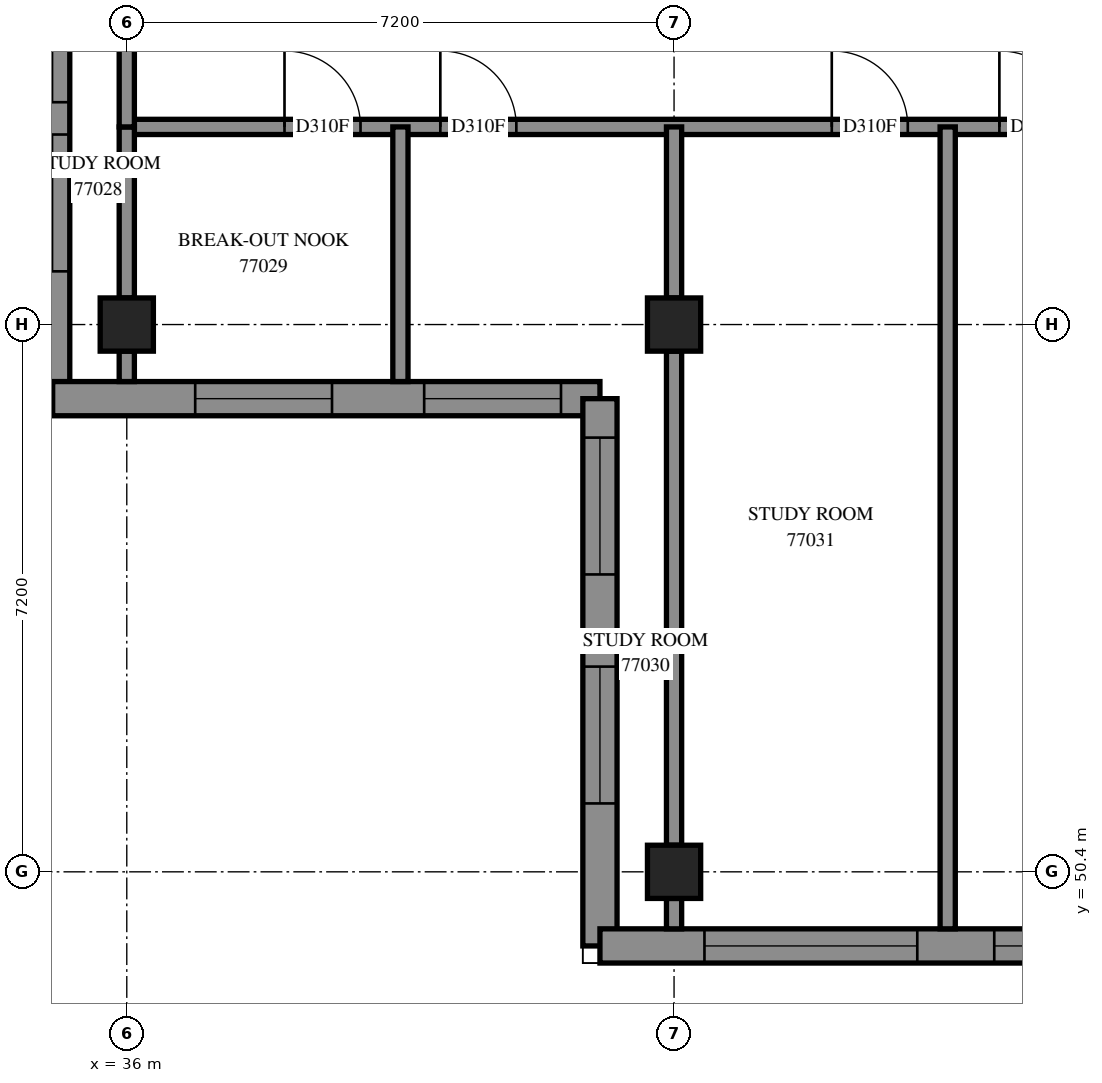
"""IFC4 building model, lengths in metres.
Left out: names, types, materials, properties, quantities, classifications, styles, units other than length and angle.
Written with IfcOpenShell. Run it as: python <this file> out.ifc"""

import sys

from ifc_helpers import new_model, si_unit, direction, frame, frame_2d, origin, origin_2d, place, context, subcontext, project, spatial, polyline, rectangle, outline, extrude, element, fill, save


model = new_model("IFC4")
c1 = context("Model", 3, precision=1e-05, world=origin(), true_north=direction((0.0, 1.0)))
c2 = subcontext(c1, "Body", "Model", "MODEL_VIEW")
j1 = project(units=[si_unit("LENGTHUNIT", "METRE"), si_unit("PLANEANGLEUNIT", "RADIAN")], contexts=[c1])
p1 = place(None, origin())
s1 = spatial("IfcSite", under=j1, at=p1, CompositionType="ELEMENT")
p2 = place(p1, origin())
s2 = spatial("IfcBuilding", under=s1, at=p2, CompositionType="ELEMENT")
p3 = place(p2, frame((0.0, 0.0, 281.2)))
s3 = spatial("IfcBuildingStorey", under=s2, at=p3, CompositionType="ELEMENT", Elevation=281.2)
for number, where, z_axis, x_axis in (
    (1, (36.0, 57.6, 0.0), (0.0, 0.0, 1.0), (1.0, 0.0, 0.0)),
    (2, (43.2, 50.4, 0.0), (0.0, 0.0, 1.0), (1.0, 0.0, 0.0)),
    (3, (43.2, 57.6, 0.0), (0.0, 0.0, 1.0), (1.0, 0.0, 0.0)),
):
    element("IfcColumn", number, at=place(p3, frame(where, z_axis=z_axis, x_axis=x_axis)), inside=s3, PredefinedType="COLUMN", context=c2, shape_type="SweptSolid", body=[
        extrude(rectangle(XDim=0.7, YDim=0.7, at=origin_2d()), origin(), (0.0, 0.0, 1.0), 3.1),
    ])
p4 = place(p3, frame((35.025, 63.825, 0.0), z_axis=(0.0, 0.0, 1.0), x_axis=(0.0, -1.0, 0.0)))
e4 = element("IfcWall", 4, at=p4, inside=s3, PredefinedType="SOLIDWALL", context=c2, shape_type="SweptSolid", body=[
    extrude(outline(polyline([(0.225, -0.225), (7.425, -0.225), (6.975, 0.225), (-0.225, 0.225), (0.225, -0.225)])), origin(), (0.0, 0.0, 1.0), 2.6),
])
p5 = place(p4, frame((3.725, 0.0, 0.6)))
e5 = element("IfcOpeningElement", 5, at=p5, cuts=e4, PredefinedType="OPENING", context=c2, shape_type="SweptSolid", body=[
    extrude(rectangle(XDim=1.8, YDim=1.9, at=frame_2d((0.9, 0.95))), frame((0.0, 0.235, 0.0), z_axis=(0.0, -1.0, 0.0), x_axis=(1.0, 0.0, 0.0)), (0.0, 0.0, 1.0), 0.47),
])
p6 = place(p4, frame((2.1, 0.0, 0.6)))
e6 = element("IfcOpeningElement", 6, at=p6, cuts=e4, PredefinedType="OPENING", context=c2, shape_type="SweptSolid", body=[
    extrude(rectangle(XDim=1.2, YDim=1.9, at=frame_2d((0.6, 0.95))), frame((0.0, 0.235, 0.0), z_axis=(0.0, -1.0, 0.0), x_axis=(1.0, 0.0, 0.0)), (0.0, 0.0, 1.0), 0.47),
])
p7 = place(p3, frame((35.025, 56.625, 0.0), z_axis=(0.0, 0.0, 1.0), x_axis=(1.0, 0.0, 0.0)))
e7 = element("IfcWall", 7, at=p7, inside=s3, PredefinedType="SOLIDWALL", context=c2, shape_type="SweptSolid", body=[
    extrude(outline(polyline([(-0.225, -0.225), (6.975, -0.225), (7.425, 0.225), (0.225, 0.225), (-0.225, -0.225)])), origin(), (0.0, 0.0, 1.0), 2.6),
])
p8 = place(p7, frame((1.875, 0.0, 0.6)))
e8 = element("IfcOpeningElement", 8, at=p8, cuts=e7, PredefinedType="OPENING", context=c2, shape_type="SweptSolid", body=[
    extrude(rectangle(XDim=1.8, YDim=1.9, at=frame_2d((0.9, 0.95))), frame((0.0, 0.235, 0.0), z_axis=(0.0, -1.0, 0.0), x_axis=(1.0, 0.0, 0.0)), (0.0, 0.0, 1.0), 0.47),
])
p9 = place(p7, frame((4.888, 0.0, 0.6)))
e9 = element("IfcOpeningElement", 9, at=p9, cuts=e7, PredefinedType="OPENING", context=c2, shape_type="SweptSolid", body=[
    extrude(rectangle(XDim=1.8, YDim=1.9, at=frame_2d((0.9, 0.95))), frame((0.0, 0.235, 0.0), z_axis=(0.0, -1.0, 0.0), x_axis=(1.0, 0.0, 0.0)), (0.0, 0.0, 1.0), 0.47),
])
p10 = place(p3, frame((42.225, 56.625, 0.0), z_axis=(0.0, 0.0, 1.0), x_axis=(0.0, -1.0, 0.0)))
e10 = element("IfcWall", 10, at=p10, inside=s3, PredefinedType="SOLIDWALL", context=c2, shape_type="SweptSolid", body=[
    extrude(outline(polyline([(0.225, -0.225), (7.425, -0.225), (6.975, 0.225), (-0.225, 0.225), (0.225, -0.225)])), origin(), (0.0, 0.0, 1.0), 2.6),
])
p11 = place(p10, frame((0.512, 0.0, 0.6)))
e11 = element("IfcOpeningElement", 11, at=p11, cuts=e10, PredefinedType="OPENING", context=c2, shape_type="SweptSolid", body=[
    extrude(rectangle(XDim=1.8, YDim=1.9, at=frame_2d((0.9, 0.95))), frame((0.0, 0.235, 0.0), z_axis=(0.0, -1.0, 0.0), x_axis=(1.0, 0.0, 0.0)), (0.0, 0.0, 1.0), 0.47),
])
p12 = place(p10, frame((3.525, 0.0, 0.6)))
e12 = element("IfcOpeningElement", 12, at=p12, cuts=e10, PredefinedType="OPENING", context=c2, shape_type="SweptSolid", body=[
    extrude(rectangle(XDim=1.8, YDim=1.9, at=frame_2d((0.9, 0.95))), frame((0.0, 0.235, 0.0), z_axis=(0.0, -1.0, 0.0), x_axis=(1.0, 0.0, 0.0)), (0.0, 0.0, 1.0), 0.47),
])
p13 = place(p3, frame((42.225, 49.425, 0.0), z_axis=(0.0, 0.0, 1.0), x_axis=(1.0, 0.0, 0.0)))
e13 = element("IfcWall", 13, at=p13, inside=s3, PredefinedType="SOLIDWALL", context=c2, shape_type="SweptSolid", body=[
    extrude(outline(polyline([(-0.225, -0.225), (6.975, -0.225), (7.425, 0.225), (0.225, 0.225), (-0.225, -0.225)])), origin(), (0.0, 0.0, 1.0), 3.1),
])
p14 = place(p13, frame((1.375, 0.0, 0.45)))
e14 = element("IfcOpeningElement", 14, at=p14, cuts=e13, PredefinedType="OPENING", context=c2, shape_type="SweptSolid", body=[
    extrude(rectangle(XDim=2.8, YDim=2.55, at=frame_2d((1.4, 1.275))), frame((0.0, 0.235, 0.0), z_axis=(0.0, -1.0, 0.0), x_axis=(1.0, 0.0, 0.0)), (0.0, 0.0, 1.0), 0.47),
])
p15 = place(p13, frame((5.188, 0.0, 0.45)))
e15 = element("IfcOpeningElement", 15, at=p15, cuts=e13, PredefinedType="OPENING", context=c2, shape_type="SweptSolid", body=[
    extrude(rectangle(XDim=1.2, YDim=2.55, at=frame_2d((0.6, 1.275))), frame((0.0, 0.235, 0.0), z_axis=(0.0, -1.0, 0.0), x_axis=(1.0, 0.0, 0.0)), (0.0, 0.0, 1.0), 0.47),
])
p16 = place(p3, frame((36.0, 60.2, 0.0), z_axis=(0.0, 0.0, 1.0), x_axis=(1.0, 0.0, 0.0)))
e16 = element("IfcWall", 16, at=p16, inside=s3, PredefinedType="PARTITIONING", context=c2, shape_type="SweptSolid", body=[
    extrude(rectangle(XDim=17.0, YDim=0.2, at=frame_2d((8.5, 0.0))), origin(), (0.0, 0.0, 1.0), 3.1),
])
p17 = place(p16, frame((15.802, 0.0, 0.0)))
e17 = element("IfcOpeningElement", 17, at=p17, cuts=e16, PredefinedType="OPENING", context=c2, shape_type="SweptSolid", body=[
    extrude(rectangle(XDim=1.0, YDim=2.1, at=frame_2d((0.5, 1.05))), frame((0.0, 0.11, 0.0), z_axis=(0.0, -1.0, 0.0), x_axis=(1.0, 0.0, 0.0)), (0.0, 0.0, 1.0), 0.22),
])
p18 = place(p16, frame((2.075, 0.0, 0.0)))
e18 = element("IfcOpeningElement", 18, at=p18, cuts=e16, PredefinedType="OPENING", context=c2, shape_type="SweptSolid", body=[
    extrude(rectangle(XDim=1.0, YDim=2.1, at=frame_2d((0.5, 1.05))), frame((0.0, 0.11, 0.0), z_axis=(0.0, -1.0, 0.0), x_axis=(1.0, 0.0, 0.0)), (0.0, 0.0, 1.0), 0.22),
])
p19 = place(p16, frame((4.125, 0.0, 0.0)))
e19 = element("IfcOpeningElement", 19, at=p19, cuts=e16, PredefinedType="OPENING", context=c2, shape_type="SweptSolid", body=[
    extrude(rectangle(XDim=1.0, YDim=2.1, at=frame_2d((0.5, 1.05))), frame((0.0, 0.11, 0.0), z_axis=(0.0, -1.0, 0.0), x_axis=(1.0, 0.0, 0.0)), (0.0, 0.0, 1.0), 0.22),
])
p20 = place(p16, frame((9.275, 0.0, 0.0)))
e20 = element("IfcOpeningElement", 20, at=p20, cuts=e16, PredefinedType="OPENING", context=c2, shape_type="SweptSolid", body=[
    extrude(rectangle(XDim=1.0, YDim=2.1, at=frame_2d((0.5, 1.05))), frame((0.0, 0.11, 0.0), z_axis=(0.0, -1.0, 0.0), x_axis=(1.0, 0.0, 0.0)), (0.0, 0.0, 1.0), 0.22),
])
p21 = place(p16, frame((11.48, 0.0, 0.0)))
e21 = element("IfcOpeningElement", 21, at=p21, cuts=e16, PredefinedType="OPENING", context=c2, shape_type="SweptSolid", body=[
    extrude(rectangle(XDim=1.0, YDim=2.1, at=frame_2d((0.5, 1.05))), frame((0.0, 0.11, 0.0), z_axis=(0.0, -1.0, 0.0), x_axis=(1.0, 0.0, 0.0)), (0.0, 0.0, 1.0), 0.22),
])
p22 = place(p3, frame((46.8, 49.65, 0.0), z_axis=(0.0, 0.0, 1.0), x_axis=(0.0, 1.0, 0.0)))
e22 = element("IfcWall", 22, at=p22, inside=s3, PredefinedType="PARTITIONING", context=c2, shape_type="SweptSolid", body=[
    extrude(rectangle(XDim=10.55, YDim=0.2, at=frame_2d((5.275, 0.0))), origin(), (0.0, 0.0, 1.0), 3.1),
])
p23 = place(p3, frame((43.2, 50.75, 0.0), z_axis=(0.0, 0.0, 1.0), x_axis=(0.0, 1.0, 0.0)))
e23 = element("IfcWall", 23, at=p23, inside=s3, PredefinedType="PARTITIONING", context=c2, shape_type="SweptSolid", body=[
    extrude(rectangle(XDim=6.5, YDim=0.2, at=frame_2d((3.25, 0.0))), origin(), (0.0, 0.0, 1.0), 2.6),
])
p24 = place(p3, frame((39.6, 56.85, 0.0), z_axis=(0.0, 0.0, 1.0), x_axis=(0.0, 1.0, 0.0)))
e24 = element("IfcWall", 24, at=p24, inside=s3, PredefinedType="PARTITIONING", context=c2, shape_type="SweptSolid", body=[
    extrude(rectangle(XDim=3.35, YDim=0.2, at=frame_2d((1.675, 0.0))), origin(), (0.0, 0.0, 1.0), 3.1),
])
p25 = place(p3, frame((36.0, 57.95, 0.0), z_axis=(0.0, 0.0, 1.0), x_axis=(0.0, 1.0, 0.0)))
e25 = element("IfcWall", 25, at=p25, inside=s3, PredefinedType="PARTITIONING", context=c2, shape_type="SweptSolid", body=[
    extrude(rectangle(XDim=2.25, YDim=0.2, at=frame_2d((1.125, 0.0))), origin(), (0.0, 0.0, 1.0), 2.6),
])
p26 = place(p3, frame((43.2, 57.95, 0.0), z_axis=(0.0, 0.0, 1.0), x_axis=(0.0, 1.0, 0.0)))
e26 = element("IfcWall", 26, at=p26, inside=s3, PredefinedType="PARTITIONING", context=c2, shape_type="SweptSolid", body=[
    extrude(rectangle(XDim=2.25, YDim=0.2, at=frame_2d((1.125, 0.0))), origin(), (0.0, 0.0, 1.0), 3.1),
])
p27 = place(p3, frame((36.0, 60.2, 0.0), z_axis=(0.0, 0.0, 1.0), x_axis=(0.0, 1.0, 0.0)))
e27 = element("IfcWall", 27, at=p27, inside=s3, PredefinedType="PARTITIONING", context=c2, shape_type="SweptSolid", body=[
    extrude(rectangle(XDim=2.0, YDim=0.2, at=frame_2d((1.0, 0.0))), origin(), (0.0, 0.0, 1.0), 2.6),
])
for number, where, z_axis, x_axis in (
    (28, (36.0, 56.85, 0.0), (0.0, 0.0, 1.0), (0.0, 1.0, 0.0)),
    (29, (43.2, 49.65, 0.0), (0.0, 0.0, 1.0), (0.0, 1.0, 0.0)),
):
    element("IfcWall", number, at=place(p3, frame(where, z_axis=z_axis, x_axis=x_axis)), inside=s3, PredefinedType="PARTITIONING", context=c2, shape_type="SweptSolid", body=[
        extrude(rectangle(XDim=0.4, YDim=0.2, at=frame_2d((0.2, 0.0))), origin(), (0.0, 0.0, 1.0), 3.1),
    ])
p28 = place(p5, origin())
e30 = element("IfcWindow", 30, at=p28, inside=s3, PartitioningType="SINGLE_PANEL", PredefinedType="WINDOW", context=c2, shape_type="SweptSolid", body=[
    extrude(rectangle(XDim=1.8, YDim=1.9, at=frame_2d((0.9, 0.95))), frame((0.0, 0.205, 0.0), z_axis=(0.0, -1.0, 0.0), x_axis=(1.0, 0.0, 0.0)), (0.0, 0.0, 1.0), 0.06),
])
fill(e5, e30)
p29 = place(p8, origin())
e31 = element("IfcWindow", 31, at=p29, inside=s3, PartitioningType="SINGLE_PANEL", PredefinedType="WINDOW", context=c2, shape_type="SweptSolid", body=[
    extrude(rectangle(XDim=1.8, YDim=1.9, at=frame_2d((0.9, 0.95))), frame((0.0, 0.205, 0.0), z_axis=(0.0, -1.0, 0.0), x_axis=(1.0, 0.0, 0.0)), (0.0, 0.0, 1.0), 0.06),
])
fill(e8, e31)
p30 = place(p9, origin())
e32 = element("IfcWindow", 32, at=p30, inside=s3, PartitioningType="SINGLE_PANEL", PredefinedType="WINDOW", context=c2, shape_type="SweptSolid", body=[
    extrude(rectangle(XDim=1.8, YDim=1.9, at=frame_2d((0.9, 0.95))), frame((0.0, 0.205, 0.0), z_axis=(0.0, -1.0, 0.0), x_axis=(1.0, 0.0, 0.0)), (0.0, 0.0, 1.0), 0.06),
])
fill(e9, e32)
p31 = place(p11, origin())
e33 = element("IfcWindow", 33, at=p31, inside=s3, PartitioningType="SINGLE_PANEL", PredefinedType="WINDOW", context=c2, shape_type="SweptSolid", body=[
    extrude(rectangle(XDim=1.8, YDim=1.9, at=frame_2d((0.9, 0.95))), frame((0.0, 0.205, 0.0), z_axis=(0.0, -1.0, 0.0), x_axis=(1.0, 0.0, 0.0)), (0.0, 0.0, 1.0), 0.06),
])
fill(e11, e33)
p32 = place(p12, origin())
e34 = element("IfcWindow", 34, at=p32, inside=s3, PartitioningType="SINGLE_PANEL", PredefinedType="WINDOW", context=c2, shape_type="SweptSolid", body=[
    extrude(rectangle(XDim=1.8, YDim=1.9, at=frame_2d((0.9, 0.95))), frame((0.0, 0.205, 0.0), z_axis=(0.0, -1.0, 0.0), x_axis=(1.0, 0.0, 0.0)), (0.0, 0.0, 1.0), 0.06),
])
fill(e12, e34)
p33 = place(p14, origin())
e35 = element("IfcWindow", 35, at=p33, inside=s3, PartitioningType="SINGLE_PANEL", PredefinedType="WINDOW", context=c2, shape_type="SweptSolid", body=[
    extrude(rectangle(XDim=2.8, YDim=2.55, at=frame_2d((1.4, 1.275))), frame((0.0, 0.205, 0.0), z_axis=(0.0, -1.0, 0.0), x_axis=(1.0, 0.0, 0.0)), (0.0, 0.0, 1.0), 0.06),
])
fill(e14, e35)
p34 = place(p15, origin())
e36 = element("IfcWindow", 36, at=p34, inside=s3, PartitioningType="SINGLE_PANEL", PredefinedType="WINDOW", context=c2, shape_type="SweptSolid", body=[
    extrude(rectangle(XDim=1.2, YDim=2.55, at=frame_2d((0.6, 1.275))), frame((0.0, 0.205, 0.0), z_axis=(0.0, -1.0, 0.0), x_axis=(1.0, 0.0, 0.0)), (0.0, 0.0, 1.0), 0.06),
])
fill(e15, e36)
p35 = place(p18, origin())
e37 = element("IfcDoor", 37, at=p35, inside=s3, OperationType="SINGLE_SWING_LEFT", PredefinedType="DOOR", context=c2, shape_type="SweptSolid", body=[
    extrude(rectangle(XDim=1.0, YDim=2.1, at=frame_2d((0.5, 1.05))), frame((0.0, 0.025, 0.0), z_axis=(0.0, -1.0, 0.0), x_axis=(1.0, 0.0, 0.0)), (0.0, 0.0, 1.0), 0.05),
])
fill(e18, e37)
p36 = place(p19, origin())
e38 = element("IfcDoor", 38, at=p36, inside=s3, OperationType="SINGLE_SWING_RIGHT", PredefinedType="DOOR", context=c2, shape_type="SweptSolid", body=[
    extrude(rectangle(XDim=1.0, YDim=2.1, at=frame_2d((0.5, 1.05))), frame((0.0, 0.025, 0.0), z_axis=(0.0, -1.0, 0.0), x_axis=(1.0, 0.0, 0.0)), (0.0, 0.0, 1.0), 0.05),
])
fill(e19, e38)
p37 = place(p20, origin())
e39 = element("IfcDoor", 39, at=p37, inside=s3, OperationType="SINGLE_SWING_LEFT", PredefinedType="DOOR", context=c2, shape_type="SweptSolid", body=[
    extrude(rectangle(XDim=1.0, YDim=2.1, at=frame_2d((0.5, 1.05))), frame((0.0, 0.025, 0.0), z_axis=(0.0, -1.0, 0.0), x_axis=(1.0, 0.0, 0.0)), (0.0, 0.0, 1.0), 0.05),
])
fill(e20, e39)
p38 = place(p21, origin())
e40 = element("IfcDoor", 40, at=p38, inside=s3, OperationType="SINGLE_SWING_RIGHT", PredefinedType="DOOR", context=c2, shape_type="SweptSolid", body=[
    extrude(rectangle(XDim=1.0, YDim=2.1, at=frame_2d((0.5, 1.05))), frame((0.0, 0.025, 0.0), z_axis=(0.0, -1.0, 0.0), x_axis=(1.0, 0.0, 0.0)), (0.0, 0.0, 1.0), 0.05),
])
fill(e21, e40)
p39 = place(p6, origin())
e41 = element("IfcWindow", 41, at=p39, inside=s3, PartitioningType="SINGLE_PANEL", PredefinedType="WINDOW", context=c2, shape_type="SweptSolid", body=[
    extrude(rectangle(XDim=1.2, YDim=1.9, at=frame_2d((0.6, 0.95))), frame((0.0, 0.205, 0.0), z_axis=(0.0, -1.0, 0.0), x_axis=(1.0, 0.0, 0.0)), (0.0, 0.0, 1.0), 0.06),
])
fill(e6, e41)
save(model, sys.argv[1])
